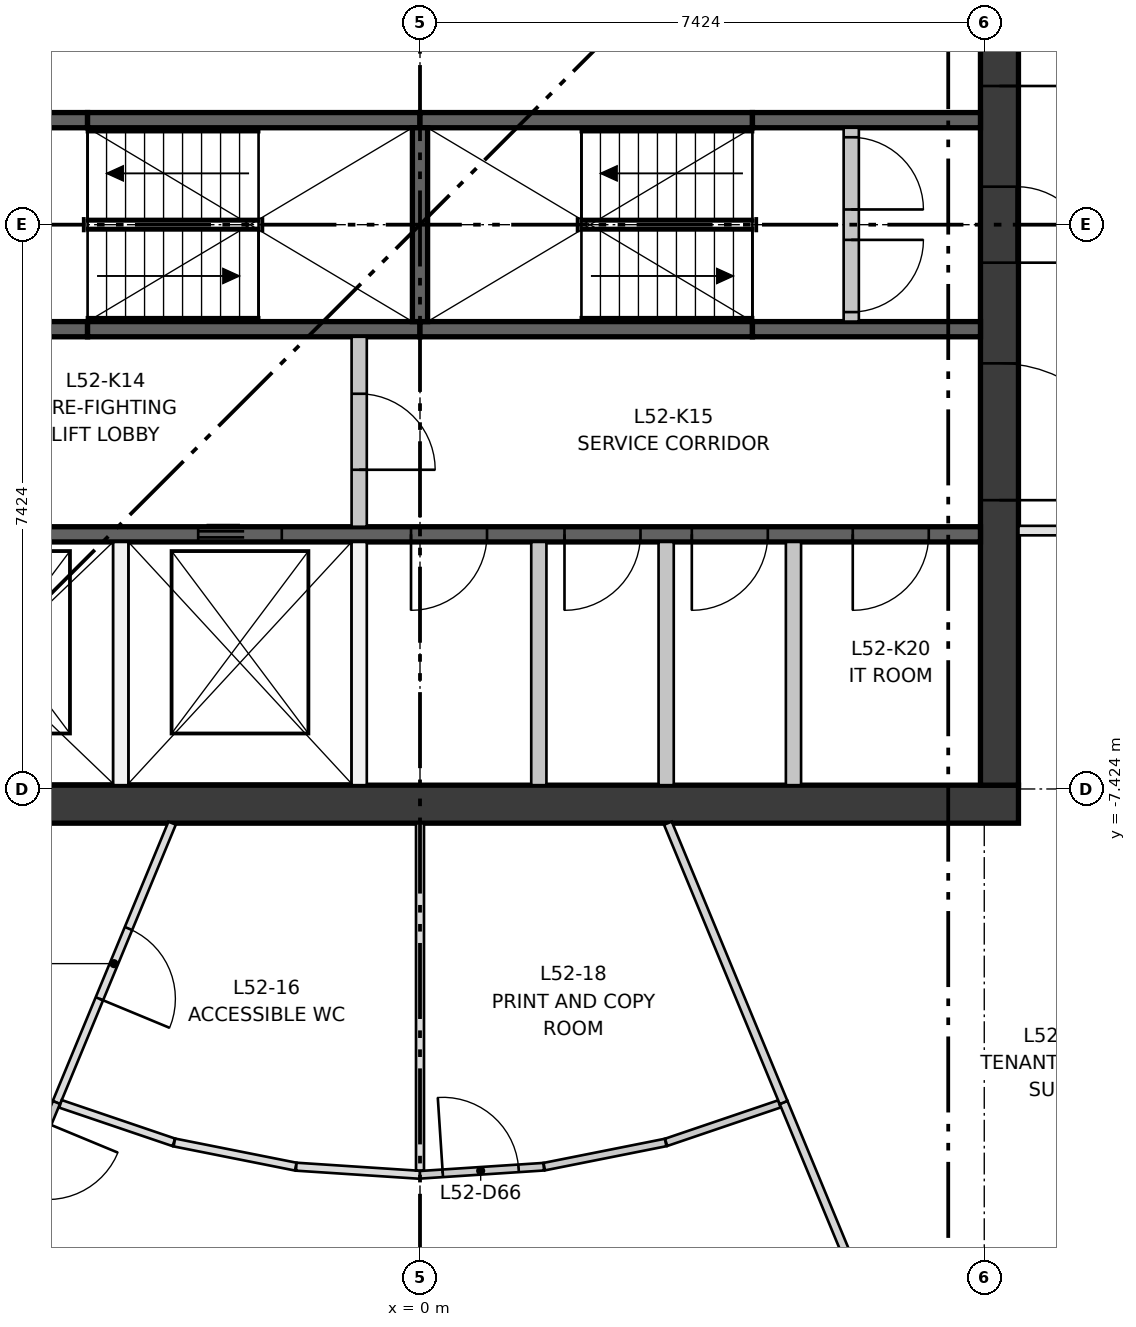
"""IFC4 building model, lengths in metres.
Left out: names, types, materials, properties, quantities, classifications, styles, units other than length and angle.
Written with IfcOpenShell. Run it as: python <this file> out.ifc"""

import sys

from ifc_helpers import new_model, si_unit, direction, frame, frame_2d, origin, place, context, subcontext, project, spatial, rectangle, extrude, element, fill, save


model = new_model("IFC4")
c1 = context("Model", 3, precision=1e-05, world=origin(), true_north=direction((0.0, 1.0)))
c2 = subcontext(c1, "Body", "Model", "MODEL_VIEW")
j1 = project(units=[si_unit("LENGTHUNIT", "METRE"), si_unit("PLANEANGLEUNIT", "RADIAN")], contexts=[c1])
p1 = place(None, origin())
s1 = spatial("IfcSite", under=j1, at=p1, CompositionType="ELEMENT")
p2 = place(p1, origin())
s2 = spatial("IfcBuilding", under=s1, at=p2, CompositionType="ELEMENT")
p3 = place(p2, frame((0.0, 0.0, 194.35)))
s3 = spatial("IfcBuildingStorey", under=s2, at=p3, CompositionType="ELEMENT", Elevation=194.35)
p4 = place(p3, frame((-7.874, -7.624, 0.0), z_axis=(0.0, 0.0, 1.0), x_axis=(1.0, 0.0, 0.0)))
e1 = element("IfcWall", 1, at=p4, inside=s3, PredefinedType="SHEAR", context=c2, shape_type="SweptSolid", body=[
    extrude(rectangle(XDim=15.748, YDim=0.5, at=frame_2d((7.874, 0.0))), origin(), (0.0, 0.0, 1.0), 3.35),
])
p5 = place(p3, frame((7.624, -7.374, 0.0), z_axis=(0.0, 0.0, 1.0), x_axis=(0.0, 1.0, 0.0)))
e2 = element("IfcWall", 2, at=p5, inside=s3, PredefinedType="SHEAR", context=c2, shape_type="SweptSolid", body=[
    extrude(rectangle(XDim=14.748, YDim=0.5, at=frame_2d((7.374, 0.0))), origin(), (0.0, 0.0, 1.0), 3.35),
])
p6 = place(p5, frame((6.874, 0.0, 0.0)))
e3 = element("IfcOpeningElement", 3, at=p6, cuts=e2, PredefinedType="OPENING", context=c2, shape_type="SweptSolid", body=[
    extrude(rectangle(XDim=1.0, YDim=2.1, at=frame_2d((0.5, 1.05))), frame((0.0, 0.26, 0.0), z_axis=(0.0, -1.0, 0.0), x_axis=(1.0, 0.0, 0.0)), (0.0, 0.0, 1.0), 0.52),
])
p7 = place(p5, frame((3.75, 0.0, 0.0)))
e4 = element("IfcOpeningElement", 4, at=p7, cuts=e2, PredefinedType="OPENING", context=c2, shape_type="SweptSolid", body=[
    extrude(rectangle(XDim=1.8, YDim=2.1, at=frame_2d((0.9, 1.05))), frame((0.0, 0.26, 0.0), z_axis=(0.0, -1.0, 0.0), x_axis=(1.0, 0.0, 0.0)), (0.0, 0.0, 1.0), 0.52),
])
p8 = place(p5, frame((9.198, 0.0, 0.0)))
e5 = element("IfcOpeningElement", 5, at=p8, cuts=e2, PredefinedType="OPENING", context=c2, shape_type="SweptSolid", body=[
    extrude(rectangle(XDim=1.8, YDim=2.1, at=frame_2d((0.9, 1.05))), frame((0.0, 0.26, 0.0), z_axis=(0.0, -1.0, 0.0), x_axis=(1.0, 0.0, 0.0)), (0.0, 0.0, 1.0), 0.52),
])
p9 = place(p3, frame((-7.374, -4.074, 0.0), z_axis=(0.0, 0.0, 1.0), x_axis=(1.0, 0.0, 0.0)))
e6 = element("IfcWall", 6, at=p9, inside=s3, PredefinedType="SHEAR", context=c2, shape_type="SweptSolid", body=[
    extrude(rectangle(XDim=14.748, YDim=0.2, at=frame_2d((7.374, 0.0))), origin(), (0.0, 0.0, 1.0), 3.0),
])
p10 = place(p9, frame((1.319, 0.0, 0.0)))
e7 = element("IfcOpeningElement", 7, at=p10, cuts=e6, PredefinedType="OPENING", context=c2, shape_type="SweptSolid", body=[
    extrude(rectangle(XDim=1.1, YDim=2.1, at=frame_2d((0.55, 1.05))), frame((0.0, 0.11, 0.0), z_axis=(0.0, -1.0, 0.0), x_axis=(1.0, 0.0, 0.0)), (0.0, 0.0, 1.0), 0.22),
])
p11 = place(p9, frame((4.456, 0.0, 0.0)))
e8 = element("IfcOpeningElement", 8, at=p11, cuts=e6, PredefinedType="OPENING", context=c2, shape_type="SweptSolid", body=[
    extrude(rectangle(XDim=1.1, YDim=2.1, at=frame_2d((0.55, 1.05))), frame((0.0, 0.11, 0.0), z_axis=(0.0, -1.0, 0.0), x_axis=(1.0, 0.0, 0.0)), (0.0, 0.0, 1.0), 0.22),
])
p12 = place(p9, frame((7.256, 0.0, 0.0)))
e9 = element("IfcOpeningElement", 9, at=p12, cuts=e6, PredefinedType="OPENING", context=c2, shape_type="SweptSolid", body=[
    extrude(rectangle(XDim=1.0, YDim=2.1, at=frame_2d((0.5, 1.05))), frame((0.0, 0.11, 0.0), z_axis=(0.0, -1.0, 0.0), x_axis=(1.0, 0.0, 0.0)), (0.0, 0.0, 1.0), 0.22),
])
p13 = place(p9, frame((9.275, 0.0, 0.0)))
e10 = element("IfcOpeningElement", 10, at=p13, cuts=e6, PredefinedType="OPENING", context=c2, shape_type="SweptSolid", body=[
    extrude(rectangle(XDim=1.0, YDim=2.1, at=frame_2d((0.5, 1.05))), frame((0.0, 0.11, 0.0), z_axis=(0.0, -1.0, 0.0), x_axis=(1.0, 0.0, 0.0)), (0.0, 0.0, 1.0), 0.22),
])
p14 = place(p9, frame((10.95, 0.0, 0.0)))
e11 = element("IfcOpeningElement", 11, at=p14, cuts=e6, PredefinedType="OPENING", context=c2, shape_type="SweptSolid", body=[
    extrude(rectangle(XDim=1.0, YDim=2.1, at=frame_2d((0.5, 1.05))), frame((0.0, 0.11, 0.0), z_axis=(0.0, -1.0, 0.0), x_axis=(1.0, 0.0, 0.0)), (0.0, 0.0, 1.0), 0.22),
])
p15 = place(p9, frame((13.068, 0.0, 0.0)))
e12 = element("IfcOpeningElement", 12, at=p15, cuts=e6, PredefinedType="OPENING", context=c2, shape_type="SweptSolid", body=[
    extrude(rectangle(XDim=1.0, YDim=2.1, at=frame_2d((0.5, 1.05))), frame((0.0, 0.11, 0.0), z_axis=(0.0, -1.0, 0.0), x_axis=(1.0, 0.0, 0.0)), (0.0, 0.0, 1.0), 0.22),
])
p16 = place(p3, frame((-7.374, -1.375, 0.0), z_axis=(0.0, 0.0, 1.0), x_axis=(1.0, 0.0, 0.0)))
e13 = element("IfcWall", 13, at=p16, inside=s3, PredefinedType="SHEAR", context=c2, shape_type="SweptSolid", body=[
    extrude(rectangle(XDim=3.0, YDim=0.2, at=frame_2d((1.5, 0.0))), origin(), (0.0, 0.0, 1.0), 3.0),
])
for number, where, z_axis, x_axis in (
    (14, (-4.374, -1.375, 0.0), (0.0, 0.0, 1.0), (1.0, 0.0, 0.0)),
    (15, (0.0, -1.375, 0.0), (0.0, 0.0, 1.0), (1.0, 0.0, 0.0)),
):
    element("IfcWall", number, at=place(p3, frame(where, z_axis=z_axis, x_axis=x_axis)), inside=s3, PredefinedType="SHEAR", context=c2, shape_type="SweptSolid", body=[
        extrude(rectangle(XDim=4.374, YDim=0.2, at=frame_2d((2.187, 0.0))), origin(), (0.0, 0.0, 1.0), 3.0),
    ])
for number, where, z_axis, x_axis in (
    (16, (4.374, -1.375, 0.0), (0.0, 0.0, 1.0), (1.0, 0.0, 0.0)),
    (17, (-7.374, 1.375, 0.0), (0.0, 0.0, 1.0), (1.0, 0.0, 0.0)),
):
    element("IfcWall", number, at=place(p3, frame(where, z_axis=z_axis, x_axis=x_axis)), inside=s3, PredefinedType="SHEAR", context=c2, shape_type="SweptSolid", body=[
        extrude(rectangle(XDim=3.0, YDim=0.2, at=frame_2d((1.5, 0.0))), origin(), (0.0, 0.0, 1.0), 3.0),
    ])
for number, where, z_axis, x_axis in (
    (18, (-4.374, 1.375, 0.0), (0.0, 0.0, 1.0), (1.0, 0.0, 0.0)),
    (19, (0.0, 1.375, 0.0), (0.0, 0.0, 1.0), (1.0, 0.0, 0.0)),
):
    element("IfcWall", number, at=place(p3, frame(where, z_axis=z_axis, x_axis=x_axis)), inside=s3, PredefinedType="SHEAR", context=c2, shape_type="SweptSolid", body=[
        extrude(rectangle(XDim=4.374, YDim=0.2, at=frame_2d((2.187, 0.0))), origin(), (0.0, 0.0, 1.0), 3.0),
    ])
p17 = place(p3, frame((4.374, 1.375, 0.0), z_axis=(0.0, 0.0, 1.0), x_axis=(1.0, 0.0, 0.0)))
e20 = element("IfcWall", 20, at=p17, inside=s3, PredefinedType="SHEAR", context=c2, shape_type="SweptSolid", body=[
    extrude(rectangle(XDim=3.0, YDim=0.2, at=frame_2d((1.5, 0.0))), origin(), (0.0, 0.0, 1.0), 3.0),
])
p18 = place(p3, frame((0.0, -1.275, 0.0), z_axis=(0.0, 0.0, 1.0), x_axis=(0.0, 1.0, 0.0)))
e21 = element("IfcWall", 21, at=p18, inside=s3, PredefinedType="SHEAR", context=c2, shape_type="SweptSolid", body=[
    extrude(rectangle(XDim=2.55, YDim=0.2, at=frame_2d((1.275, 0.0))), origin(), (0.0, 0.0, 1.0), 3.0),
])
for number, where, z_axis, x_axis in (
    (22, (-3.937, -7.374, 0.0), (0.0, 0.0, 1.0), (0.0, 1.0, 0.0)),
    (23, (-0.8, -7.374, 0.0), (0.0, 0.0, 1.0), (0.0, 1.0, 0.0)),
):
    element("IfcWall", number, at=place(p3, frame(where, z_axis=z_axis, x_axis=x_axis)), inside=s3, PredefinedType="PARTITIONING", context=c2, shape_type="SweptSolid", body=[
        extrude(rectangle(XDim=3.2, YDim=0.2, at=frame_2d((1.6, 0.0))), origin(), (0.0, 0.0, 1.0), 3.0),
    ])
p19 = place(p3, frame((-0.8, -3.974, 0.0), z_axis=(0.0, 0.0, 1.0), x_axis=(0.0, 1.0, 0.0)))
e24 = element("IfcWall", 24, at=p19, inside=s3, PredefinedType="PARTITIONING", context=c2, shape_type="SweptSolid", body=[
    extrude(rectangle(XDim=2.499, YDim=0.2, at=frame_2d((1.25, 0.0))), origin(), (0.0, 0.0, 1.0), 3.0),
])
p20 = place(p19, frame((0.75, 0.0, 0.0)))
e25 = element("IfcOpeningElement", 25, at=p20, cuts=e24, PredefinedType="OPENING", context=c2, shape_type="SweptSolid", body=[
    extrude(rectangle(XDim=1.0, YDim=2.1, at=frame_2d((0.5, 1.05))), frame((0.0, 0.11, 0.0), z_axis=(0.0, -1.0, 0.0), x_axis=(1.0, 0.0, 0.0)), (0.0, 0.0, 1.0), 0.22),
])
for number, where, z_axis, x_axis in (
    (26, (1.563, -7.374, 0.0), (0.0, 0.0, 1.0), (0.0, 1.0, 0.0)),
    (27, (3.239, -7.374, 0.0), (0.0, 0.0, 1.0), (0.0, 1.0, 0.0)),
    (28, (4.914, -7.374, 0.0), (0.0, 0.0, 1.0), (0.0, 1.0, 0.0)),
):
    element("IfcWall", number, at=place(p3, frame(where, z_axis=z_axis, x_axis=x_axis)), inside=s3, PredefinedType="PARTITIONING", context=c2, shape_type="SweptSolid", body=[
        extrude(rectangle(XDim=3.2, YDim=0.2, at=frame_2d((1.6, 0.0))), origin(), (0.0, 0.0, 1.0), 3.0),
    ])
p21 = place(p3, frame((5.674, -1.275, 0.0), z_axis=(0.0, 0.0, 1.0), x_axis=(0.0, 1.0, 0.0)))
e29 = element("IfcWall", 29, at=p21, inside=s3, PredefinedType="PARTITIONING", context=c2, shape_type="SweptSolid", body=[
    extrude(rectangle(XDim=2.55, YDim=0.2, at=frame_2d((1.275, 0.0))), origin(), (0.0, 0.0, 1.0), 3.0),
])
p22 = place(p21, frame((0.125, 0.0, 0.0)))
e30 = element("IfcOpeningElement", 30, at=p22, cuts=e29, PredefinedType="OPENING", context=c2, shape_type="SweptSolid", body=[
    extrude(rectangle(XDim=0.95, YDim=2.1, at=frame_2d((0.475, 1.05))), frame((0.0, 0.11, 0.0), z_axis=(0.0, -1.0, 0.0), x_axis=(1.0, 0.0, 0.0)), (0.0, 0.0, 1.0), 0.22),
])
p23 = place(p21, frame((1.475, 0.0, 0.0)))
e31 = element("IfcOpeningElement", 31, at=p23, cuts=e29, PredefinedType="OPENING", context=c2, shape_type="SweptSolid", body=[
    extrude(rectangle(XDim=0.95, YDim=2.1, at=frame_2d((0.475, 1.05))), frame((0.0, 0.11, 0.0), z_axis=(0.0, -1.0, 0.0), x_axis=(1.0, 0.0, 0.0)), (0.0, 0.0, 1.0), 0.22),
])
p24 = place(p3, frame((11.824, -4.024, 0.0), z_axis=(0.0, 0.0, 1.0), x_axis=(-1.0, 0.0, 0.0)))
e32 = element("IfcWall", 32, at=p24, inside=s3, PredefinedType="PARTITIONING", context=c2, shape_type="SweptSolid", body=[
    extrude(rectangle(XDim=3.95, YDim=0.125, at=frame_2d((1.975, 0.0))), origin(), (0.0, 0.0, 1.0), 3.0),
])
p25 = place(p24, frame((1.1, 0.0, 0.0)))
e33 = element("IfcOpeningElement", 33, at=p25, cuts=e32, PredefinedType="OPENING", context=c2, shape_type="SweptSolid", body=[
    extrude(rectangle(XDim=1.8, YDim=2.1, at=frame_2d((0.9, 1.05))), frame((0.0, 0.073, 0.0), z_axis=(0.0, -1.0, 0.0), x_axis=(1.0, 0.0, 0.0)), (0.0, 0.0, 1.0), 0.145),
])
p26 = place(p3, frame((-3.261, -7.874, 0.0), z_axis=(0.0, 0.0, 1.0), x_axis=(-0.382666229821, -0.923886657851, 0.0)))
e34 = element("IfcWall", 34, at=p26, inside=s3, PredefinedType="PARTITIONING", context=c2, shape_type="SweptSolid", body=[
    extrude(rectangle(XDim=3.977, YDim=0.105, at=frame_2d((1.989, 0.0))), origin(), (0.0, 0.0, 1.0), 3.0),
])
p27 = place(p26, frame((1.5, 0.0, 0.0)))
e35 = element("IfcOpeningElement", 35, at=p27, cuts=e34, PredefinedType="OPENING", context=c2, shape_type="SweptSolid", body=[
    extrude(rectangle(XDim=1.0, YDim=2.1, at=frame_2d((0.5, 1.05))), frame((0.0, 0.062, 0.0), z_axis=(0.0, -1.0, 0.0), x_axis=(1.0, 0.0, 0.0)), (0.0, 0.0, 1.0), 0.125),
])
p28 = place(p3, frame((-4.783, -11.549, 0.0), z_axis=(0.0, 0.0, 1.0), x_axis=(-0.382689912762, -0.923876848216, 0.0)))
e36 = element("IfcWall", 36, at=p28, inside=s3, PredefinedType="PARTITIONING", context=c2, shape_type="SweptSolid", body=[
    extrude(rectangle(XDim=3.72, YDim=0.1, at=frame_2d((1.86, 0.0))), origin(), (0.0, 0.0, 1.0), 3.0),
])
p29 = place(p28, frame((0.3, 0.0, 0.0)))
e37 = element("IfcOpeningElement", 37, at=p29, cuts=e36, PredefinedType="OPENING", context=c2, shape_type="SweptSolid", body=[
    extrude(rectangle(XDim=1.0, YDim=2.1, at=frame_2d((0.5, 1.05))), frame((0.0, 0.06, 0.0), z_axis=(0.0, -1.0, 0.0), x_axis=(1.0, 0.0, 0.0)), (0.0, 0.0, 1.0), 0.12),
])
p30 = place(p3, frame((-3.239, -12.073, 0.0), z_axis=(0.0, 0.0, 1.0), x_axis=(-0.946902062217, 0.321522136982, 0.0)))
e38 = element("IfcWall", 38, at=p30, inside=s3, PredefinedType="PARTITIONING", context=c2, shape_type="SweptSolid", body=[
    extrude(rectangle(XDim=1.576, YDim=0.105, at=frame_2d((0.788, 0.0))), origin(), (0.0, 0.0, 1.0), 3.0),
])
p31 = place(p3, frame((-1.635, -12.392, 0.0), z_axis=(0.0, 0.0, 1.0), x_axis=(-0.980782034379, 0.195106640172, 0.0)))
e39 = element("IfcWall", 39, at=p31, inside=s3, PredefinedType="PARTITIONING", context=c2, shape_type="SweptSolid", body=[
    extrude(rectangle(XDim=1.628, YDim=0.105, at=frame_2d((0.814, 0.0))), origin(), (0.0, 0.0, 1.0), 3.0),
])
p32 = place(p3, frame((0.0, -12.5, 0.0), z_axis=(0.0, 0.0, 1.0), x_axis=(-0.997859990953, 0.065386837014, 0.0)))
e40 = element("IfcWall", 40, at=p32, inside=s3, PredefinedType="PARTITIONING", context=c2, shape_type="SweptSolid", body=[
    extrude(rectangle(XDim=1.632, YDim=0.105, at=frame_2d((0.816, 0.0))), origin(), (0.0, 0.0, 1.0), 3.0),
])
p33 = place(p3, frame((0.0, -7.874, 0.0), z_axis=(0.0, 0.0, 1.0), x_axis=(0.0, -1.0, 0.0)))
e41 = element("IfcWall", 41, at=p33, inside=s3, PredefinedType="PARTITIONING", context=c2, shape_type="SweptSolid", body=[
    extrude(rectangle(XDim=4.57, YDim=0.105, at=frame_2d((2.285, 0.0))), origin(), (0.0, 0.0, 1.0), 3.0),
])
p34 = place(p3, frame((0.0, -12.5, 0.0), z_axis=(0.0, 0.0, 1.0), x_axis=(0.997860630529, 0.065377075793, 0.0)))
e42 = element("IfcWall", 42, at=p34, inside=s3, PredefinedType="PARTITIONING", context=c2, shape_type="SweptSolid", body=[
    extrude(rectangle(XDim=1.632, YDim=0.1, at=frame_2d((0.816, 0.0))), origin(), (0.0, 0.0, 1.0), 3.0),
])
p35 = place(p34, frame((0.3, 0.0, 0.0)))
e43 = element("IfcOpeningElement", 43, at=p35, cuts=e42, PredefinedType="OPENING", context=c2, shape_type="SweptSolid", body=[
    extrude(rectangle(XDim=1.0, YDim=2.1, at=frame_2d((0.5, 1.05))), frame((0.0, 0.06, 0.0), z_axis=(0.0, -1.0, 0.0), x_axis=(1.0, 0.0, 0.0)), (0.0, 0.0, 1.0), 0.12),
])
p36 = place(p3, frame((1.635, -12.393, 0.0), z_axis=(0.0, 0.0, 1.0), x_axis=(0.980764756379, 0.195193474902, 0.0)))
e44 = element("IfcWall", 44, at=p36, inside=s3, PredefinedType="PARTITIONING", context=c2, shape_type="SweptSolid", body=[
    extrude(rectangle(XDim=1.628, YDim=0.1, at=frame_2d((0.814, 0.0))), origin(), (0.0, 0.0, 1.0), 3.0),
])
p37 = place(p3, frame((3.238, -12.073, 0.0), z_axis=(0.0, 0.0, 1.0), x_axis=(0.946962681405, 0.321343554512, 0.0)))
e45 = element("IfcWall", 45, at=p37, inside=s3, PredefinedType="PARTITIONING", context=c2, shape_type="SweptSolid", body=[
    extrude(rectangle(XDim=1.573, YDim=0.1, at=frame_2d((0.787, 0.0))), origin(), (0.0, 0.0, 1.0), 3.0),
])
p38 = place(p3, frame((4.783, -11.549, 0.0), z_axis=(0.0, 0.0, 1.0), x_axis=(0.382689912762, -0.923876848216, 0.0)))
e46 = element("IfcWall", 46, at=p38, inside=s3, PredefinedType="PARTITIONING", context=c2, shape_type="SweptSolid", body=[
    extrude(rectangle(XDim=3.72, YDim=0.11, at=frame_2d((1.86, 0.0))), origin(), (0.0, 0.0, 1.0), 3.0),
])
p39 = place(p3, frame((3.261, -7.874, 0.0), z_axis=(0.0, 0.0, 1.0), x_axis=(0.382666229821, -0.923886657851, 0.0)))
e47 = element("IfcWall", 47, at=p39, inside=s3, PredefinedType="PARTITIONING", context=c2, shape_type="SweptSolid", body=[
    extrude(rectangle(XDim=3.977, YDim=0.11, at=frame_2d((1.989, 0.0))), origin(), (0.0, 0.0, 1.0), 3.0),
])
p40 = place(p11, origin())
e48 = element("IfcDoor", 48, at=p40, inside=s3, OperationType="DOUBLE_DOOR_SLIDING", PredefinedType="DOOR", context=c2, shape_type="SweptSolid", body=[
    extrude(rectangle(XDim=1.1, YDim=2.1, at=frame_2d((0.55, 1.05))), frame((0.0, 0.025, 0.0), z_axis=(0.0, -1.0, 0.0), x_axis=(1.0, 0.0, 0.0)), (0.0, 0.0, 1.0), 0.05),
])
fill(e8, e48)
p41 = place(p22, frame((0.95, 0.0, 0.0), z_axis=(0.0, 0.0, 1.0), x_axis=(-1.0, 0.0, 0.0)))
e49 = element("IfcDoor", 49, at=p41, inside=s3, OperationType="SINGLE_SWING_RIGHT", PredefinedType="DOOR", context=c2, shape_type="SweptSolid", body=[
    extrude(rectangle(XDim=0.95, YDim=2.1, at=frame_2d((0.475, 1.05))), frame((0.0, 0.025, 0.0), z_axis=(0.0, -1.0, 0.0), x_axis=(1.0, 0.0, 0.0)), (0.0, 0.0, 1.0), 0.05),
])
fill(e30, e49)
p42 = place(p23, frame((0.95, 0.0, 0.0), z_axis=(0.0, 0.0, 1.0), x_axis=(-1.0, 0.0, 0.0)))
e50 = element("IfcDoor", 50, at=p42, inside=s3, OperationType="SINGLE_SWING_LEFT", PredefinedType="DOOR", context=c2, shape_type="SweptSolid", body=[
    extrude(rectangle(XDim=0.95, YDim=2.1, at=frame_2d((0.475, 1.05))), frame((0.0, 0.025, 0.0), z_axis=(0.0, -1.0, 0.0), x_axis=(1.0, 0.0, 0.0)), (0.0, 0.0, 1.0), 0.05),
])
fill(e31, e50)
p43 = place(p20, frame((1.0, 0.0, 0.0), z_axis=(0.0, 0.0, 1.0), x_axis=(-1.0, 0.0, 0.0)))
e51 = element("IfcDoor", 51, at=p43, inside=s3, OperationType="SINGLE_SWING_LEFT", PredefinedType="DOOR", context=c2, shape_type="SweptSolid", body=[
    extrude(rectangle(XDim=1.0, YDim=2.1, at=frame_2d((0.5, 1.05))), frame((0.0, 0.025, 0.0), z_axis=(0.0, -1.0, 0.0), x_axis=(1.0, 0.0, 0.0)), (0.0, 0.0, 1.0), 0.05),
])
fill(e25, e51)
p44 = place(p12, frame((1.0, 0.0, 0.0), z_axis=(0.0, 0.0, 1.0), x_axis=(-1.0, 0.0, 0.0)))
e52 = element("IfcDoor", 52, at=p44, inside=s3, OperationType="SINGLE_SWING_LEFT", PredefinedType="DOOR", context=c2, shape_type="SweptSolid", body=[
    extrude(rectangle(XDim=1.0, YDim=2.1, at=frame_2d((0.5, 1.05))), frame((0.0, 0.025, 0.0), z_axis=(0.0, -1.0, 0.0), x_axis=(1.0, 0.0, 0.0)), (0.0, 0.0, 1.0), 0.05),
])
fill(e9, e52)
p45 = place(p13, frame((1.0, 0.0, 0.0), z_axis=(0.0, 0.0, 1.0), x_axis=(-1.0, 0.0, 0.0)))
e53 = element("IfcDoor", 53, at=p45, inside=s3, OperationType="SINGLE_SWING_LEFT", PredefinedType="DOOR", context=c2, shape_type="SweptSolid", body=[
    extrude(rectangle(XDim=1.0, YDim=2.1, at=frame_2d((0.5, 1.05))), frame((0.0, 0.025, 0.0), z_axis=(0.0, -1.0, 0.0), x_axis=(1.0, 0.0, 0.0)), (0.0, 0.0, 1.0), 0.05),
])
fill(e10, e53)
p46 = place(p14, frame((1.0, 0.0, 0.0), z_axis=(0.0, 0.0, 1.0), x_axis=(-1.0, 0.0, 0.0)))
e54 = element("IfcDoor", 54, at=p46, inside=s3, OperationType="SINGLE_SWING_LEFT", PredefinedType="DOOR", context=c2, shape_type="SweptSolid", body=[
    extrude(rectangle(XDim=1.0, YDim=2.1, at=frame_2d((0.5, 1.05))), frame((0.0, 0.025, 0.0), z_axis=(0.0, -1.0, 0.0), x_axis=(1.0, 0.0, 0.0)), (0.0, 0.0, 1.0), 0.05),
])
fill(e11, e54)
p47 = place(p15, frame((1.0, 0.0, 0.0), z_axis=(0.0, 0.0, 1.0), x_axis=(-1.0, 0.0, 0.0)))
e55 = element("IfcDoor", 55, at=p47, inside=s3, OperationType="SINGLE_SWING_LEFT", PredefinedType="DOOR", context=c2, shape_type="SweptSolid", body=[
    extrude(rectangle(XDim=1.0, YDim=2.1, at=frame_2d((0.5, 1.05))), frame((0.0, 0.025, 0.0), z_axis=(0.0, -1.0, 0.0), x_axis=(1.0, 0.0, 0.0)), (0.0, 0.0, 1.0), 0.05),
])
fill(e12, e55)
p48 = place(p6, frame((1.0, 0.0, 0.0), z_axis=(0.0, 0.0, 1.0), x_axis=(-1.0, 0.0, 0.0)))
e56 = element("IfcDoor", 56, at=p48, inside=s3, OperationType="SINGLE_SWING_LEFT", PredefinedType="DOOR", context=c2, shape_type="SweptSolid", body=[
    extrude(rectangle(XDim=1.0, YDim=2.1, at=frame_2d((0.5, 1.05))), frame((0.0, 0.25, 0.0), z_axis=(0.0, -1.0, 0.0), x_axis=(1.0, 0.0, 0.0)), (0.0, 0.0, 1.0), 0.05),
])
fill(e3, e56)
p49 = place(p7, frame((1.8, 0.0, 0.0), z_axis=(0.0, 0.0, 1.0), x_axis=(-1.0, 0.0, 0.0)))
e57 = element("IfcDoor", 57, at=p49, inside=s3, OperationType="DOUBLE_DOOR_SINGLE_SWING", PredefinedType="DOOR", context=c2, shape_type="SweptSolid", body=[
    extrude(rectangle(XDim=1.8, YDim=2.1, at=frame_2d((0.9, 1.05))), frame((0.0, 0.025, 0.0), z_axis=(0.0, -1.0, 0.0), x_axis=(1.0, 0.0, 0.0)), (0.0, 0.0, 1.0), 0.05),
])
fill(e4, e57)
p50 = place(p8, frame((1.8, 0.0, 0.0), z_axis=(0.0, 0.0, 1.0), x_axis=(-1.0, 0.0, 0.0)))
e58 = element("IfcDoor", 58, at=p50, inside=s3, OperationType="DOUBLE_DOOR_SINGLE_SWING", PredefinedType="DOOR", context=c2, shape_type="SweptSolid", body=[
    extrude(rectangle(XDim=1.8, YDim=2.1, at=frame_2d((0.9, 1.05))), frame((0.0, 0.025, 0.0), z_axis=(0.0, -1.0, 0.0), x_axis=(1.0, 0.0, 0.0)), (0.0, 0.0, 1.0), 0.05),
])
fill(e5, e58)
p51 = place(p27, origin())
e59 = element("IfcDoor", 59, at=p51, inside=s3, OperationType="SINGLE_SWING_RIGHT", PredefinedType="DOOR", context=c2, shape_type="SweptSolid", body=[
    extrude(rectangle(XDim=1.0, YDim=2.1, at=frame_2d((0.5, 1.05))), frame((0.0, 0.025, 0.0), z_axis=(0.0, -1.0, 0.0), x_axis=(1.0, 0.0, 0.0)), (0.0, 0.0, 1.0), 0.05),
])
fill(e35, e59)
p52 = place(p35, origin())
e60 = element("IfcDoor", 60, at=p52, inside=s3, OperationType="SINGLE_SWING_LEFT", PredefinedType="DOOR", context=c2, shape_type="SweptSolid", body=[
    extrude(rectangle(XDim=1.0, YDim=2.1, at=frame_2d((0.5, 1.05))), frame((0.0, 0.025, 0.0), z_axis=(0.0, -1.0, 0.0), x_axis=(1.0, 0.0, 0.0)), (0.0, 0.0, 1.0), 0.05),
])
fill(e43, e60)
save(model, sys.argv[1])
